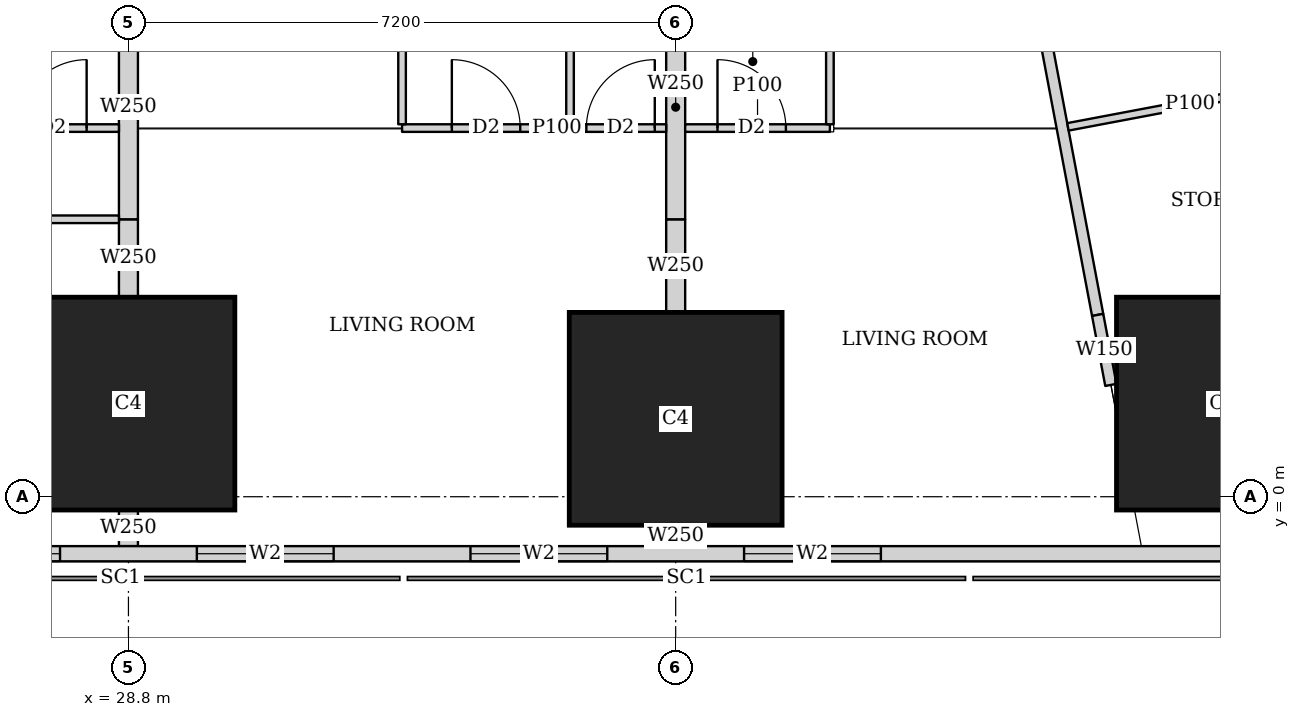
"""IFC4 building model, lengths in metres.
Left out: names, types, materials, properties, quantities, classifications, styles, units other than length and angle.
Written with IfcOpenShell. Run it as: python <this file> out.ifc"""

import sys

from ifc_helpers import new_model, si_unit, direction, frame, frame_2d, origin, origin_2d, place, context, subcontext, project, spatial, rectangle, extrude, element, fill, save


model = new_model("IFC4")
c1 = context("Model", 3, precision=1e-05, world=origin(), true_north=direction((0.0, 1.0)))
c2 = subcontext(c1, "Body", "Model", "MODEL_VIEW")
j1 = project(units=[si_unit("LENGTHUNIT", "METRE"), si_unit("PLANEANGLEUNIT", "RADIAN")], contexts=[c1])
p1 = place(None, origin())
s1 = spatial("IfcSite", under=j1, at=p1, CompositionType="ELEMENT")
p2 = place(p1, origin())
s2 = spatial("IfcBuilding", under=s1, at=p2, CompositionType="ELEMENT")
p3 = place(p2, frame((0.0, 0.0, 53.75)))
s3 = spatial("IfcBuildingStorey", under=s2, at=p3, CompositionType="ELEMENT", Elevation=53.75)
for number, where, z_axis, x_axis in (
    (1, (28.8, 1.225, 0.0), (0.0, 0.0, 1.0), (1.0, 0.0, 0.0)),
    (2, (36.0, 1.025, 0.0), (0.0, 0.0, 1.0), (1.0, 0.0, 0.0)),
    (3, (43.2, 1.225, 0.0), (0.0, 0.0, 1.0), (1.0, 0.0, 0.0)),
):
    element("IfcColumn", number, at=place(p3, frame(where, z_axis=z_axis, x_axis=x_axis)), inside=s3, PredefinedType="COLUMN", context=c2, shape_type="SweptSolid", body=[
        extrude(rectangle(XDim=2.8, YDim=2.8, at=origin_2d()), origin(), (0.0, 0.0, 1.0), 3.75),
    ])
p4 = place(p3, frame((2.163, -0.75, 0.0), z_axis=(0.0, 0.0, 1.0), x_axis=(1.0, 0.0, 0.0)))
e4 = element("IfcWall", 4, at=p4, inside=s3, PredefinedType="SOLIDWALL", context=c2, shape_type="SweptSolid", body=[
    extrude(rectangle(XDim=45.628, YDim=0.2, at=frame_2d((22.814, 0.0))), origin(), (0.0, 0.0, 1.0), 3.5),
])
p5 = place(p4, frame((9.537, 0.0, 0.9)))
e5 = element("IfcOpeningElement", 5, at=p5, cuts=e4, PredefinedType="OPENING", context=c2, shape_type="SweptSolid", body=[
    extrude(rectangle(XDim=1.8, YDim=1.5, at=frame_2d((0.9, 0.75))), frame((0.0, 0.11, 0.0), z_axis=(0.0, -1.0, 0.0), x_axis=(1.0, 0.0, 0.0)), (0.0, 0.0, 1.0), 0.22),
])
p6 = place(p4, frame((13.137, 0.0, 0.9)))
e6 = element("IfcOpeningElement", 6, at=p6, cuts=e4, PredefinedType="OPENING", context=c2, shape_type="SweptSolid", body=[
    extrude(rectangle(XDim=1.8, YDim=1.5, at=frame_2d((0.9, 0.75))), frame((0.0, 0.11, 0.0), z_axis=(0.0, -1.0, 0.0), x_axis=(1.0, 0.0, 0.0)), (0.0, 0.0, 1.0), 0.22),
])
p7 = place(p4, frame((16.737, 0.0, 0.9)))
e7 = element("IfcOpeningElement", 7, at=p7, cuts=e4, PredefinedType="OPENING", context=c2, shape_type="SweptSolid", body=[
    extrude(rectangle(XDim=1.8, YDim=1.5, at=frame_2d((0.9, 0.75))), frame((0.0, 0.11, 0.0), z_axis=(0.0, -1.0, 0.0), x_axis=(1.0, 0.0, 0.0)), (0.0, 0.0, 1.0), 0.22),
])
p8 = place(p4, frame((20.337, 0.0, 0.9)))
e8 = element("IfcOpeningElement", 8, at=p8, cuts=e4, PredefinedType="OPENING", context=c2, shape_type="SweptSolid", body=[
    extrude(rectangle(XDim=1.8, YDim=1.5, at=frame_2d((0.9, 0.75))), frame((0.0, 0.11, 0.0), z_axis=(0.0, -1.0, 0.0), x_axis=(1.0, 0.0, 0.0)), (0.0, 0.0, 1.0), 0.22),
])
p9 = place(p4, frame((23.937, 0.0, 0.9)))
e9 = element("IfcOpeningElement", 9, at=p9, cuts=e4, PredefinedType="OPENING", context=c2, shape_type="SweptSolid", body=[
    extrude(rectangle(XDim=1.8, YDim=1.5, at=frame_2d((0.9, 0.75))), frame((0.0, 0.11, 0.0), z_axis=(0.0, -1.0, 0.0), x_axis=(1.0, 0.0, 0.0)), (0.0, 0.0, 1.0), 0.22),
])
p10 = place(p4, frame((27.537, 0.0, 0.9)))
e10 = element("IfcOpeningElement", 10, at=p10, cuts=e4, PredefinedType="OPENING", context=c2, shape_type="SweptSolid", body=[
    extrude(rectangle(XDim=1.8, YDim=1.5, at=frame_2d((0.9, 0.75))), frame((0.0, 0.11, 0.0), z_axis=(0.0, -1.0, 0.0), x_axis=(1.0, 0.0, 0.0)), (0.0, 0.0, 1.0), 0.22),
])
p11 = place(p4, frame((31.137, 0.0, 0.9)))
e11 = element("IfcOpeningElement", 11, at=p11, cuts=e4, PredefinedType="OPENING", context=c2, shape_type="SweptSolid", body=[
    extrude(rectangle(XDim=1.8, YDim=1.5, at=frame_2d((0.9, 0.75))), frame((0.0, 0.11, 0.0), z_axis=(0.0, -1.0, 0.0), x_axis=(1.0, 0.0, 0.0)), (0.0, 0.0, 1.0), 0.22),
])
p12 = place(p4, frame((34.737, 0.0, 0.9)))
e12 = element("IfcOpeningElement", 12, at=p12, cuts=e4, PredefinedType="OPENING", context=c2, shape_type="SweptSolid", body=[
    extrude(rectangle(XDim=1.8, YDim=1.5, at=frame_2d((0.9, 0.75))), frame((0.0, 0.11, 0.0), z_axis=(0.0, -1.0, 0.0), x_axis=(1.0, 0.0, 0.0)), (0.0, 0.0, 1.0), 0.22),
])
p13 = place(p3, frame((50.653, 2.703, 0.0), z_axis=(0.0, 0.0, 1.0), x_axis=(-0.185612026696, 0.982623109613, 0.0)))
e13 = element("IfcWall", 13, at=p13, inside=s3, PredefinedType="SOLIDWALL", context=c2, shape_type="SweptSolid", body=[
    extrude(rectangle(XDim=41.393, YDim=0.2, at=frame_2d((20.697, 0.0))), origin(), (0.0, 0.0, 1.0), 3.5),
])
p14 = place(p13, frame((1.633, 0.0, 0.9)))
e14 = element("IfcOpeningElement", 14, at=p14, cuts=e13, PredefinedType="OPENING", context=c2, shape_type="SweptSolid", body=[
    extrude(rectangle(XDim=1.8, YDim=1.5, at=frame_2d((0.9, 0.75))), frame((0.0, 0.11, 0.0), z_axis=(0.0, -1.0, 0.0), x_axis=(1.0, 0.0, 0.0)), (0.0, 0.0, 1.0), 0.22),
])
p15 = place(p13, frame((6.032, 0.0, 0.9)))
e15 = element("IfcOpeningElement", 15, at=p15, cuts=e13, PredefinedType="OPENING", context=c2, shape_type="SweptSolid", body=[
    extrude(rectangle(XDim=1.8, YDim=1.5, at=frame_2d((0.9, 0.75))), frame((0.0, 0.11, 0.0), z_axis=(0.0, -1.0, 0.0), x_axis=(1.0, 0.0, 0.0)), (0.0, 0.0, 1.0), 0.22),
])
p16 = place(p13, frame((9.848, 0.0, 0.9)))
e16 = element("IfcOpeningElement", 16, at=p16, cuts=e13, PredefinedType="OPENING", context=c2, shape_type="SweptSolid", body=[
    extrude(rectangle(XDim=1.8, YDim=1.5, at=frame_2d((0.9, 0.75))), frame((0.0, 0.11, 0.0), z_axis=(0.0, -1.0, 0.0), x_axis=(1.0, 0.0, 0.0)), (0.0, 0.0, 1.0), 0.22),
])
p17 = place(p13, frame((17.481, 0.0, 0.9)))
e17 = element("IfcOpeningElement", 17, at=p17, cuts=e13, PredefinedType="OPENING", context=c2, shape_type="SweptSolid", body=[
    extrude(rectangle(XDim=1.8, YDim=1.5, at=frame_2d((0.9, 0.75))), frame((0.0, 0.11, 0.0), z_axis=(0.0, -1.0, 0.0), x_axis=(1.0, 0.0, 0.0)), (0.0, 0.0, 1.0), 0.22),
])
p18 = place(p13, frame((21.297, 0.0, 0.9)))
e18 = element("IfcOpeningElement", 18, at=p18, cuts=e13, PredefinedType="OPENING", context=c2, shape_type="SweptSolid", body=[
    extrude(rectangle(XDim=1.8, YDim=1.5, at=frame_2d((0.9, 0.75))), frame((0.0, 0.11, 0.0), z_axis=(0.0, -1.0, 0.0), x_axis=(1.0, 0.0, 0.0)), (0.0, 0.0, 1.0), 0.22),
])
p19 = place(p13, frame((25.113, 0.0, 0.9)))
e19 = element("IfcOpeningElement", 19, at=p19, cuts=e13, PredefinedType="OPENING", context=c2, shape_type="SweptSolid", body=[
    extrude(rectangle(XDim=1.8, YDim=1.5, at=frame_2d((0.9, 0.75))), frame((0.0, 0.11, 0.0), z_axis=(0.0, -1.0, 0.0), x_axis=(1.0, 0.0, 0.0)), (0.0, 0.0, 1.0), 0.22),
])
p20 = place(p13, frame((28.93, 0.0, 0.9)))
e20 = element("IfcOpeningElement", 20, at=p20, cuts=e13, PredefinedType="OPENING", context=c2, shape_type="SweptSolid", body=[
    extrude(rectangle(XDim=1.8, YDim=1.5, at=frame_2d((0.9, 0.75))), frame((0.0, 0.11, 0.0), z_axis=(0.0, -1.0, 0.0), x_axis=(1.0, 0.0, 0.0)), (0.0, 0.0, 1.0), 0.22),
])
p21 = place(p13, frame((32.746, 0.0, 0.9)))
e21 = element("IfcOpeningElement", 21, at=p21, cuts=e13, PredefinedType="OPENING", context=c2, shape_type="SweptSolid", body=[
    extrude(rectangle(XDim=1.8, YDim=1.5, at=frame_2d((0.9, 0.75))), frame((0.0, 0.11, 0.0), z_axis=(0.0, -1.0, 0.0), x_axis=(1.0, 0.0, 0.0)), (0.0, 0.0, 1.0), 0.22),
])
p22 = place(p13, frame((36.481, 0.0, 0.9)))
e22 = element("IfcOpeningElement", 22, at=p22, cuts=e13, PredefinedType="OPENING", context=c2, shape_type="SweptSolid", body=[
    extrude(rectangle(XDim=1.8, YDim=1.5, at=frame_2d((0.9, 0.75))), frame((0.0, 0.11, 0.0), z_axis=(0.0, -1.0, 0.0), x_axis=(1.0, 0.0, 0.0)), (0.0, 0.0, 1.0), 0.22),
])
p23 = place(p3, frame((35.094, 36.585, 0.0), z_axis=(0.0, 0.0, 1.0), x_axis=(0.185588860311, -0.982627485331, 0.0)))
e23 = element("IfcWall", 23, at=p23, inside=s3, PredefinedType="SOLIDWALL", context=c2, shape_type="SweptSolid", body=[
    extrude(rectangle(XDim=34.797, YDim=0.15, at=frame_2d((17.399, 0.0))), origin(), (0.0, 0.0, 1.0), 2.5),
])
p24 = place(p23, frame((9.828, 0.0, 0.0)))
e24 = element("IfcOpeningElement", 24, at=p24, cuts=e23, PredefinedType="OPENING", context=c2, shape_type="SweptSolid", body=[
    extrude(rectangle(XDim=1.0, YDim=2.1, at=frame_2d((0.5, 1.05))), frame((0.0, 0.085, 0.0), z_axis=(0.0, -1.0, 0.0), x_axis=(1.0, 0.0, 0.0)), (0.0, 0.0, 1.0), 0.17),
])
p25 = place(p23, frame((13.645, 0.0, 0.0)))
e25 = element("IfcOpeningElement", 25, at=p25, cuts=e23, PredefinedType="OPENING", context=c2, shape_type="SweptSolid", body=[
    extrude(rectangle(XDim=1.0, YDim=2.1, at=frame_2d((0.5, 1.05))), frame((0.0, 0.085, 0.0), z_axis=(0.0, -1.0, 0.0), x_axis=(1.0, 0.0, 0.0)), (0.0, 0.0, 1.0), 0.17),
])
p26 = place(p23, frame((25.9, 0.0, 0.0)))
e26 = element("IfcOpeningElement", 26, at=p26, cuts=e23, PredefinedType="OPENING", context=c2, shape_type="SweptSolid", body=[
    extrude(rectangle(XDim=1.0, YDim=2.1, at=frame_2d((0.5, 1.05))), frame((0.0, 0.085, 0.0), z_axis=(0.0, -1.0, 0.0), x_axis=(1.0, 0.0, 0.0)), (0.0, 0.0, 1.0), 0.17),
])
p27 = place(p3, frame((41.552, 2.392, 0.0), z_axis=(0.0, 0.0, 1.0), x_axis=(0.185687800081, -0.982608793417, 0.0)))
e27 = element("IfcWall", 27, at=p27, inside=s3, PredefinedType="SOLIDWALL", context=c2, shape_type="SweptSolid", body=[
    extrude(rectangle(XDim=0.938, YDim=0.15, at=frame_2d((0.469, 0.0))), origin(), (0.0, 0.0, 1.0), 2.05),
])
p28 = place(p3, frame((28.675, 3.65, 0.0), z_axis=(0.0, 0.0, 1.0), x_axis=(-1.0, 0.0, 0.0)))
e28 = element("IfcWall", 28, at=p28, inside=s3, PredefinedType="PARTITIONING", context=c2, shape_type="SweptSolid", body=[
    extrude(rectangle(XDim=7.075, YDim=0.1, at=frame_2d((3.538, 0.0))), origin(), (0.0, 0.0, 1.0), 3.5),
])
p29 = place(p28, frame((4.75, 0.0, 0.0)))
e29 = element("IfcOpeningElement", 29, at=p29, cuts=e28, PredefinedType="OPENING", context=c2, shape_type="SweptSolid", body=[
    extrude(rectangle(XDim=0.9, YDim=2.1, at=frame_2d((0.45, 1.05))), frame((0.0, 0.06, 0.0), z_axis=(0.0, -1.0, 0.0), x_axis=(1.0, 0.0, 0.0)), (0.0, 0.0, 1.0), 0.12),
])
p30 = place(p28, frame((2.375, 0.0, 0.0)))
e30 = element("IfcOpeningElement", 30, at=p30, cuts=e28, PredefinedType="OPENING", context=c2, shape_type="SweptSolid", body=[
    extrude(rectangle(XDim=0.9, YDim=2.1, at=frame_2d((0.45, 1.05))), frame((0.0, 0.06, 0.0), z_axis=(0.0, -1.0, 0.0), x_axis=(1.0, 0.0, 0.0)), (0.0, 0.0, 1.0), 0.12),
])
p31 = place(p3, frame((28.675, 4.85, 0.0), z_axis=(0.0, 0.0, 1.0), x_axis=(-1.0, 0.0, 0.0)))
e31 = element("IfcWall", 31, at=p31, inside=s3, PredefinedType="PARTITIONING", context=c2, shape_type="SweptSolid", body=[
    extrude(rectangle(XDim=7.075, YDim=0.1, at=frame_2d((3.538, 0.0))), origin(), (0.0, 0.0, 1.0), 3.5),
])
p32 = place(p31, frame((5.52, 0.0, 0.0)))
e32 = element("IfcOpeningElement", 32, at=p32, cuts=e31, PredefinedType="OPENING", context=c2, shape_type="SweptSolid", body=[
    extrude(rectangle(XDim=0.9, YDim=2.1, at=frame_2d((0.45, 1.05))), frame((0.0, 0.06, 0.0), z_axis=(0.0, -1.0, 0.0), x_axis=(1.0, 0.0, 0.0)), (0.0, 0.0, 1.0), 0.12),
])
p33 = place(p31, frame((2.225, 0.0, 0.0)))
e33 = element("IfcOpeningElement", 33, at=p33, cuts=e31, PredefinedType="OPENING", context=c2, shape_type="SweptSolid", body=[
    extrude(rectangle(XDim=0.9, YDim=2.1, at=frame_2d((0.45, 1.05))), frame((0.0, 0.06, 0.0), z_axis=(0.0, -1.0, 0.0), x_axis=(1.0, 0.0, 0.0)), (0.0, 0.0, 1.0), 0.12),
])
p34 = place(p31, frame((3.72, 0.0, 0.0)))
e34 = element("IfcOpeningElement", 34, at=p34, cuts=e31, PredefinedType="OPENING", context=c2, shape_type="SweptSolid", body=[
    extrude(rectangle(XDim=0.9, YDim=2.1, at=frame_2d((0.45, 1.05))), frame((0.0, 0.06, 0.0), z_axis=(0.0, -1.0, 0.0), x_axis=(1.0, 0.0, 0.0)), (0.0, 0.0, 1.0), 0.12),
])
p35 = place(p31, frame((0.425, 0.0, 0.0)))
e35 = element("IfcOpeningElement", 35, at=p35, cuts=e31, PredefinedType="OPENING", context=c2, shape_type="SweptSolid", body=[
    extrude(rectangle(XDim=0.9, YDim=2.1, at=frame_2d((0.45, 1.05))), frame((0.0, 0.06, 0.0), z_axis=(0.0, -1.0, 0.0), x_axis=(1.0, 0.0, 0.0)), (0.0, 0.0, 1.0), 0.12),
])
p36 = place(p3, frame((35.875, 4.85, 0.0), z_axis=(0.0, 0.0, 1.0), x_axis=(-1.0, 0.0, 0.0)))
e36 = element("IfcWall", 36, at=p36, inside=s3, PredefinedType="PARTITIONING", context=c2, shape_type="SweptSolid", body=[
    extrude(rectangle(XDim=3.475, YDim=0.1, at=frame_2d((1.738, 0.0))), origin(), (0.0, 0.0, 1.0), 3.5),
])
p37 = place(p36, frame((1.92, 0.0, 0.0)))
e37 = element("IfcOpeningElement", 37, at=p37, cuts=e36, PredefinedType="OPENING", context=c2, shape_type="SweptSolid", body=[
    extrude(rectangle(XDim=0.9, YDim=2.1, at=frame_2d((0.45, 1.05))), frame((0.0, 0.06, 0.0), z_axis=(0.0, -1.0, 0.0), x_axis=(1.0, 0.0, 0.0)), (0.0, 0.0, 1.0), 0.12),
])
p38 = place(p36, frame((0.15, 0.0, 0.0)))
e38 = element("IfcOpeningElement", 38, at=p38, cuts=e36, PredefinedType="OPENING", context=c2, shape_type="SweptSolid", body=[
    extrude(rectangle(XDim=0.9, YDim=2.1, at=frame_2d((0.45, 1.05))), frame((0.0, 0.06, 0.0), z_axis=(0.0, -1.0, 0.0), x_axis=(1.0, 0.0, 0.0)), (0.0, 0.0, 1.0), 0.12),
])
for number, where, z_axis, x_axis in (
    (39, (32.4, 4.9, 0.0), (0.0, 0.0, 1.0), (0.0, 1.0, 0.0)),
    (40, (34.61, 4.9, 0.0), (0.0, 0.0, 1.0), (0.0, 1.0, 0.0)),
):
    element("IfcWall", number, at=place(p3, frame(where, z_axis=z_axis, x_axis=x_axis)), inside=s3, PredefinedType="PARTITIONING", context=c2, shape_type="SweptSolid", body=[
        extrude(rectangle(XDim=3.275, YDim=0.1, at=frame_2d((1.638, 0.0))), origin(), (0.0, 0.0, 1.0), 3.5),
    ])
p39 = place(p3, frame((28.8, -0.65, 0.0), z_axis=(0.0, 0.0, 1.0), x_axis=(0.0, 1.0, 0.0)))
e41 = element("IfcWall", 41, at=p39, inside=s3, PredefinedType="SOLIDWALL", context=c2, shape_type="SweptSolid", body=[
    extrude(rectangle(XDim=0.474, YDim=0.25, at=frame_2d((0.237, 0.0))), origin(), (0.0, 0.0, 1.0), 3.5),
])
p40 = place(p3, frame((28.8, 2.626, 0.0), z_axis=(0.0, 0.0, 1.0), x_axis=(0.0, 1.0, 0.0)))
e42 = element("IfcWall", 42, at=p40, inside=s3, PredefinedType="SOLIDWALL", context=c2, shape_type="SweptSolid", body=[
    extrude(rectangle(XDim=1.024, YDim=0.25, at=frame_2d((0.512, 0.0))), origin(), (0.0, 0.0, 1.0), 3.5),
])
p41 = place(p3, frame((28.8, 3.65, 0.0), z_axis=(0.0, 0.0, 1.0), x_axis=(0.0, 1.0, 0.0)))
e43 = element("IfcWall", 43, at=p41, inside=s3, PredefinedType="SOLIDWALL", context=c2, shape_type="SweptSolid", body=[
    extrude(rectangle(XDim=2.949, YDim=0.25, at=frame_2d((1.475, 0.0))), origin(), (0.0, 0.0, 1.0), 3.5),
])
p42 = place(p3, frame((38.029, 4.85, 0.0), z_axis=(0.0, 0.0, 1.0), x_axis=(-1.0, 0.0, 0.0)))
e44 = element("IfcWall", 44, at=p42, inside=s3, PredefinedType="PARTITIONING", context=c2, shape_type="SweptSolid", body=[
    extrude(rectangle(XDim=1.904, YDim=0.1, at=frame_2d((0.952, 0.0))), origin(), (0.0, 0.0, 1.0), 3.5),
])
p43 = place(p42, frame((0.579, 0.0, 0.0)))
e45 = element("IfcOpeningElement", 45, at=p43, cuts=e44, PredefinedType="OPENING", context=c2, shape_type="SweptSolid", body=[
    extrude(rectangle(XDim=0.9, YDim=2.1, at=frame_2d((0.45, 1.05))), frame((0.0, 0.06, 0.0), z_axis=(0.0, -1.0, 0.0), x_axis=(1.0, 0.0, 0.0)), (0.0, 0.0, 1.0), 0.12),
])
p44 = place(p3, frame((38.029, 4.9, 0.0), z_axis=(0.0, 0.0, 1.0), x_axis=(0.0, 1.0, 0.0)))
e46 = element("IfcWall", 46, at=p44, inside=s3, PredefinedType="PARTITIONING", context=c2, shape_type="SweptSolid", body=[
    extrude(rectangle(XDim=3.275, YDim=0.1, at=frame_2d((1.638, 0.0))), origin(), (0.0, 0.0, 1.0), 3.5),
])
p45 = place(p3, frame((36.0, -0.65, 0.0), z_axis=(0.0, 0.0, 1.0), x_axis=(0.0, 1.0, 0.0)))
e47 = element("IfcWall", 47, at=p45, inside=s3, PredefinedType="SOLIDWALL", context=c2, shape_type="SweptSolid", body=[
    extrude(rectangle(XDim=0.274, YDim=0.25, at=frame_2d((0.137, 0.0))), origin(), (0.0, 0.0, 1.0), 3.5),
])
p46 = place(p3, frame((36.0, 2.426, 0.0), z_axis=(0.0, 0.0, 1.0), x_axis=(0.0, 1.0, 0.0)))
e48 = element("IfcWall", 48, at=p46, inside=s3, PredefinedType="SOLIDWALL", context=c2, shape_type="SweptSolid", body=[
    extrude(rectangle(XDim=1.224, YDim=0.25, at=frame_2d((0.612, 0.0))), origin(), (0.0, 0.0, 1.0), 3.5),
])
p47 = place(p3, frame((36.0, 3.65, 0.0), z_axis=(0.0, 0.0, 1.0), x_axis=(0.0, 1.0, 0.0)))
e49 = element("IfcWall", 49, at=p47, inside=s3, PredefinedType="SOLIDWALL", context=c2, shape_type="SweptSolid", body=[
    extrude(rectangle(XDim=2.949, YDim=0.25, at=frame_2d((1.475, 0.0))), origin(), (0.0, 0.0, 1.0), 3.5),
])
p48 = place(p3, frame((44.379, 5.474, 0.0), z_axis=(0.0, 0.0, 1.0), x_axis=(-0.982607026909, -0.185697147715, 0.0)))
e50 = element("IfcWall", 50, at=p48, inside=s3, PredefinedType="PARTITIONING", context=c2, shape_type="SweptSolid", body=[
    extrude(rectangle(XDim=3.275, YDim=0.1, at=frame_2d((1.637, 0.0))), origin(), (0.0, 0.0, 1.0), 3.5),
])
p49 = place(p9, origin())
e51 = element("IfcWindow", 51, at=p49, inside=s3, PartitioningType="SINGLE_PANEL", PredefinedType="WINDOW", context=c2, shape_type="SweptSolid", body=[
    extrude(rectangle(XDim=1.8, YDim=1.5, at=frame_2d((0.9, 0.75))), frame((0.0, 0.03, 0.0), z_axis=(0.0, -1.0, 0.0), x_axis=(1.0, 0.0, 0.0)), (0.0, 0.0, 1.0), 0.06),
])
fill(e9, e51)
p50 = place(p10, origin())
e52 = element("IfcWindow", 52, at=p50, inside=s3, PartitioningType="SINGLE_PANEL", PredefinedType="WINDOW", context=c2, shape_type="SweptSolid", body=[
    extrude(rectangle(XDim=1.8, YDim=1.5, at=frame_2d((0.9, 0.75))), frame((0.0, 0.03, 0.0), z_axis=(0.0, -1.0, 0.0), x_axis=(1.0, 0.0, 0.0)), (0.0, 0.0, 1.0), 0.06),
])
fill(e10, e52)
p51 = place(p11, origin())
e53 = element("IfcWindow", 53, at=p51, inside=s3, PartitioningType="SINGLE_PANEL", PredefinedType="WINDOW", context=c2, shape_type="SweptSolid", body=[
    extrude(rectangle(XDim=1.8, YDim=1.5, at=frame_2d((0.9, 0.75))), frame((0.0, 0.03, 0.0), z_axis=(0.0, -1.0, 0.0), x_axis=(1.0, 0.0, 0.0)), (0.0, 0.0, 1.0), 0.06),
])
fill(e11, e53)
p52 = place(p12, origin())
e54 = element("IfcWindow", 54, at=p52, inside=s3, PartitioningType="SINGLE_PANEL", PredefinedType="WINDOW", context=c2, shape_type="SweptSolid", body=[
    extrude(rectangle(XDim=1.8, YDim=1.5, at=frame_2d((0.9, 0.75))), frame((0.0, 0.03, 0.0), z_axis=(0.0, -1.0, 0.0), x_axis=(1.0, 0.0, 0.0)), (0.0, 0.0, 1.0), 0.06),
])
fill(e12, e54)
p53 = place(p35, origin())
e55 = element("IfcDoor", 55, at=p53, inside=s3, OperationType="SINGLE_SWING_RIGHT", PredefinedType="DOOR", context=c2, shape_type="SweptSolid", body=[
    extrude(rectangle(XDim=0.9, YDim=2.1, at=frame_2d((0.45, 1.05))), frame((0.0, 0.025, 0.0), z_axis=(0.0, -1.0, 0.0), x_axis=(1.0, 0.0, 0.0)), (0.0, 0.0, 1.0), 0.05),
])
fill(e35, e55)
p54 = place(p37, origin())
e56 = element("IfcDoor", 56, at=p54, inside=s3, OperationType="SINGLE_SWING_LEFT", PredefinedType="DOOR", context=c2, shape_type="SweptSolid", body=[
    extrude(rectangle(XDim=0.9, YDim=2.1, at=frame_2d((0.45, 1.05))), frame((0.0, 0.025, 0.0), z_axis=(0.0, -1.0, 0.0), x_axis=(1.0, 0.0, 0.0)), (0.0, 0.0, 1.0), 0.05),
])
fill(e37, e56)
p55 = place(p38, origin())
e57 = element("IfcDoor", 57, at=p55, inside=s3, OperationType="SINGLE_SWING_RIGHT", PredefinedType="DOOR", context=c2, shape_type="SweptSolid", body=[
    extrude(rectangle(XDim=0.9, YDim=2.1, at=frame_2d((0.45, 1.05))), frame((0.0, 0.025, 0.0), z_axis=(0.0, -1.0, 0.0), x_axis=(1.0, 0.0, 0.0)), (0.0, 0.0, 1.0), 0.05),
])
fill(e38, e57)
p56 = place(p43, origin())
e58 = element("IfcDoor", 58, at=p56, inside=s3, OperationType="SINGLE_SWING_LEFT", PredefinedType="DOOR", context=c2, shape_type="SweptSolid", body=[
    extrude(rectangle(XDim=0.9, YDim=2.1, at=frame_2d((0.45, 1.05))), frame((0.0, 0.025, 0.0), z_axis=(0.0, -1.0, 0.0), x_axis=(1.0, 0.0, 0.0)), (0.0, 0.0, 1.0), 0.05),
])
fill(e45, e58)
save(model, sys.argv[1])
